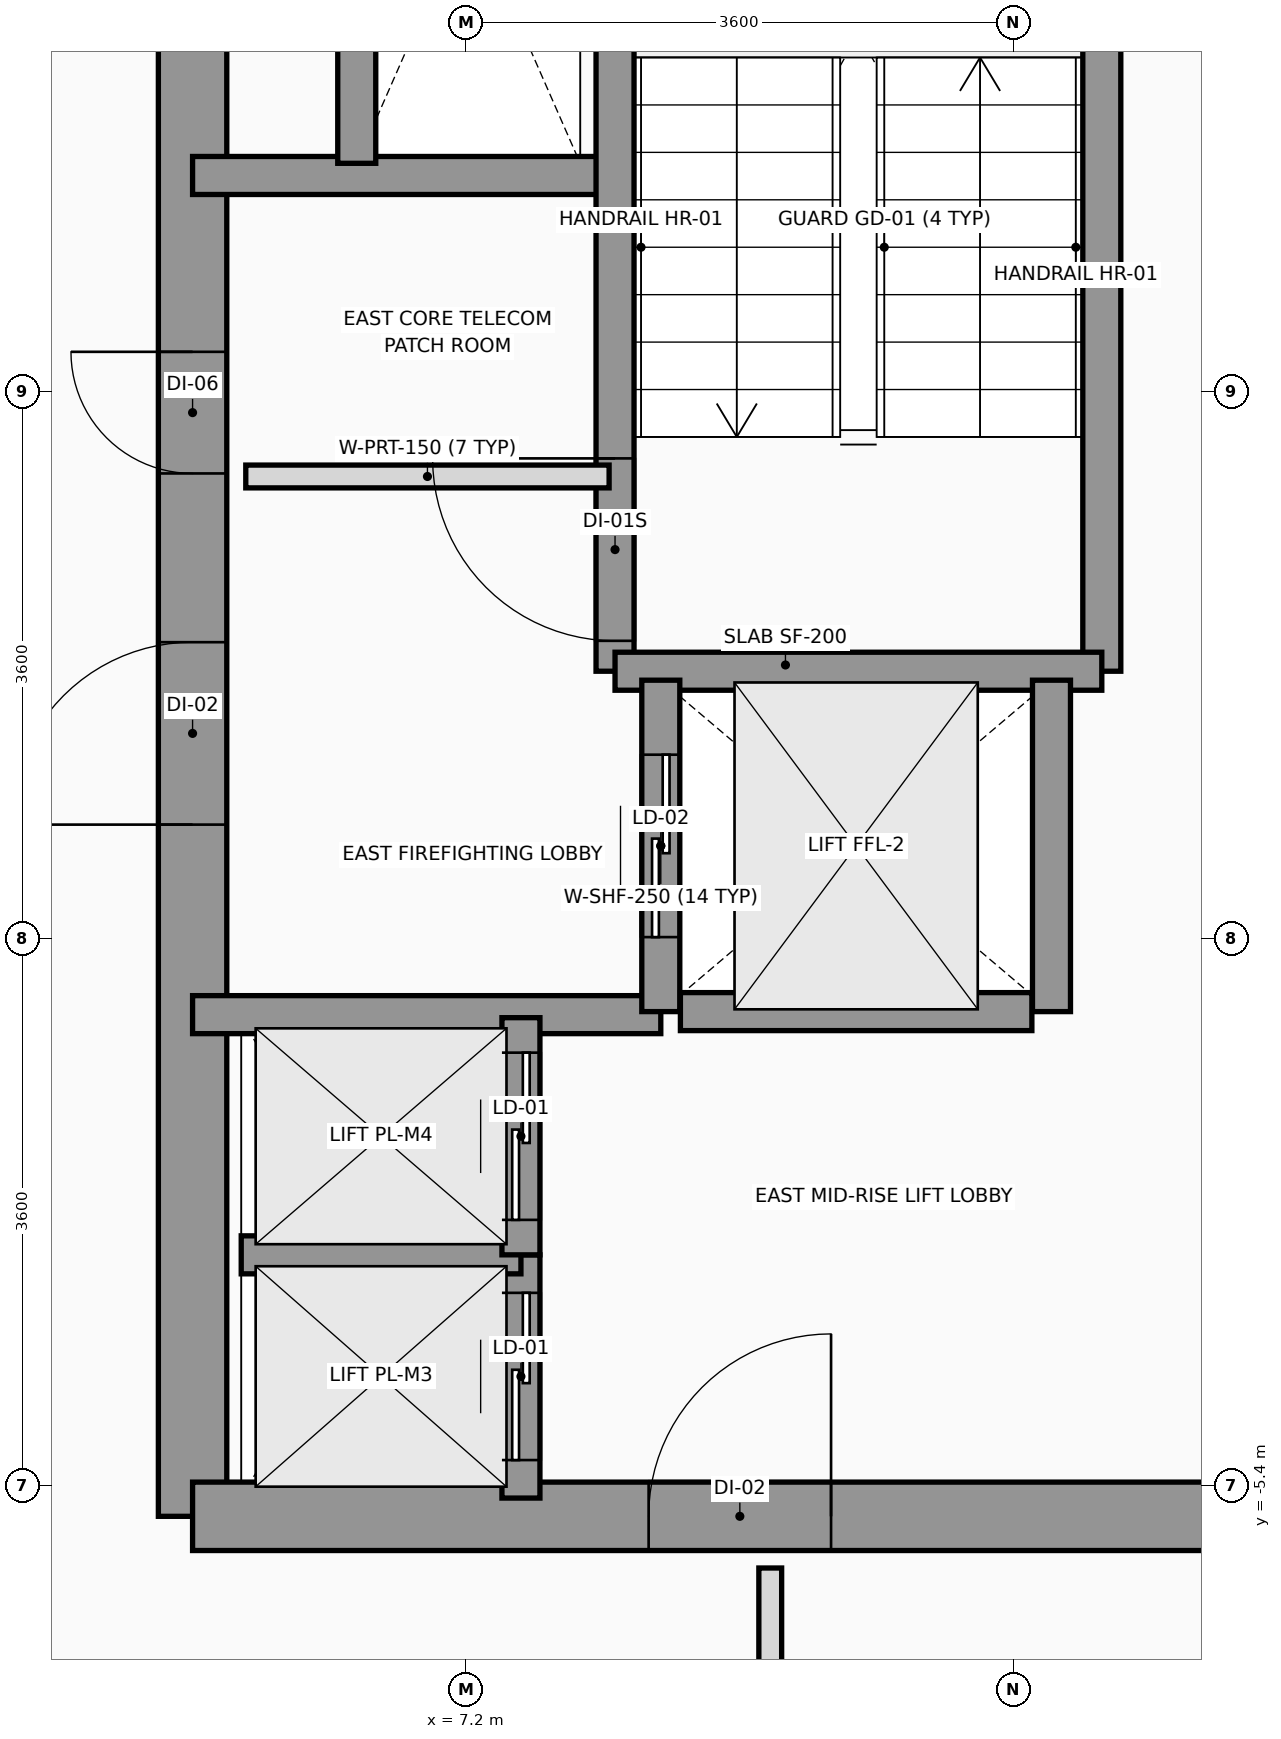
"""IFC4 building model, lengths in metres.
Left out: names, types, materials, properties, quantities, classifications, styles, units other than length and angle.
Written with IfcOpenShell. Run it as: python <this file> out.ifc"""

import sys

from ifc_helpers import new_model, si_unit, direction, frame, frame_2d, origin, place, context, subcontext, project, spatial, rectangle, extrude, source, transform, mapped, element, fill, save


model = new_model("IFC4")
c1 = context("Model", 3, precision=1e-05, world=origin(), true_north=direction((0.0, 1.0)))
c2 = subcontext(c1, "Body", "Model", "MODEL_VIEW")
j1 = project(units=[si_unit("LENGTHUNIT", "METRE"), si_unit("PLANEANGLEUNIT", "RADIAN")], contexts=[c1])
p1 = place(None, origin())
s1 = spatial("IfcSite", under=j1, at=p1, CompositionType="ELEMENT")
p2 = place(p1, origin())
s2 = spatial("IfcBuilding", under=s1, at=p2, CompositionType="ELEMENT")
p3 = place(p2, frame((0.0, 0.0, 100.6)))
s3 = spatial("IfcBuildingStorey", under=s2, at=p3, CompositionType="ELEMENT", Elevation=100.6)
p4 = place(p3, frame((5.4, -5.6, 0.0), z_axis=(0.0, 0.0, 1.0), x_axis=(0.0, 1.0, 0.0)))
e1 = element("IfcWall", 1, at=p4, inside=s3, PredefinedType="SHEAR", context=c2, shape_type="SweptSolid", body=[
    extrude(rectangle(XDim=12.5, YDim=0.45, at=frame_2d((6.25, 0.0))), origin(), (0.0, 0.0, 1.0), 3.2),
])
p5 = place(p4, frame((4.55, 0.0, 0.0)))
e2 = element("IfcOpeningElement", 2, at=p5, cuts=e1, PredefinedType="OPENING", context=c2, shape_type="SweptSolid", body=[
    extrude(rectangle(XDim=1.2, YDim=2.2, at=frame_2d((0.6, 1.1))), frame((0.0, 0.235, 0.0), z_axis=(0.0, -1.0, 0.0), x_axis=(1.0, 0.0, 0.0)), (0.0, 0.0, 1.0), 0.47),
])
p6 = place(p4, frame((6.86, 0.0, 0.0)))
e3 = element("IfcOpeningElement", 3, at=p6, cuts=e1, PredefinedType="OPENING", context=c2, shape_type="SweptSolid", body=[
    extrude(rectangle(XDim=0.8, YDim=2.1, at=frame_2d((0.4, 1.05))), frame((0.0, 0.235, 0.0), z_axis=(0.0, -1.0, 0.0), x_axis=(1.0, 0.0, 0.0)), (0.0, 0.0, 1.0), 0.47),
])
p7 = place(p3, frame((5.4, -5.6, 0.0), z_axis=(0.0, 0.0, 1.0), x_axis=(1.0, 0.0, 0.0)))
e4 = element("IfcWall", 4, at=p7, inside=s3, PredefinedType="SHEAR", context=c2, shape_type="SweptSolid", body=[
    extrude(rectangle(XDim=7.8, YDim=0.45, at=frame_2d((3.9, 0.0))), origin(), (0.0, 0.0, 1.0), 3.2),
])
p8 = place(p7, frame((3.0, 0.0, 0.0)))
e5 = element("IfcOpeningElement", 5, at=p8, cuts=e4, PredefinedType="OPENING", context=c2, shape_type="SweptSolid", body=[
    extrude(rectangle(XDim=1.2, YDim=2.2, at=frame_2d((0.6, 1.1))), frame((0.0, 0.235, 0.0), z_axis=(0.0, -1.0, 0.0), x_axis=(1.0, 0.0, 0.0)), (0.0, 0.0, 1.0), 0.47),
])
p9 = place(p3, frame((5.4, 3.22, 0.0), z_axis=(0.0, 0.0, 1.0), x_axis=(1.0, 0.0, 0.0)))
e6 = element("IfcWall", 6, at=p9, inside=s3, PredefinedType="SOLIDWALL", context=c2, shape_type="SweptSolid", body=[
    extrude(rectangle(XDim=2.78, YDim=0.25, at=frame_2d((1.39, 0.0))), origin(), (0.0, 0.0, 1.0), 3.2),
])
p10 = place(p3, frame((5.4, -2.3, 0.0), z_axis=(0.0, 0.0, 1.0), x_axis=(1.0, 0.0, 0.0)))
e7 = element("IfcWall", 7, at=p10, inside=s3, PredefinedType="SOLIDWALL", context=c2, shape_type="SweptSolid", body=[
    extrude(rectangle(XDim=3.08, YDim=0.25, at=frame_2d((1.54, 0.0))), origin(), (0.0, 0.0, 1.0), 3.2),
])
p11 = place(p3, frame((8.179, -0.041, 0.0), z_axis=(0.0, 0.0, 1.0), x_axis=(0.0, 1.0, 0.0)))
e8 = element("IfcWall", 8, at=p11, inside=s3, PredefinedType="SOLIDWALL", context=c2, shape_type="SweptSolid", body=[
    extrude(rectangle(XDim=6.941, YDim=0.25, at=frame_2d((3.47, 0.0))), origin(), (0.0, 0.0, 1.0), 3.2),
])
p12 = place(p11, frame((0.2, 0.0, 0.0)))
e9 = element("IfcOpeningElement", 9, at=p12, cuts=e8, PredefinedType="OPENING", context=c2, shape_type="SweptSolid", body=[
    extrude(rectangle(XDim=1.2, YDim=2.2, at=frame_2d((0.6, 1.1))), frame((0.0, 0.135, 0.0), z_axis=(0.0, -1.0, 0.0), x_axis=(1.0, 0.0, 0.0)), (0.0, 0.0, 1.0), 0.27),
])
p13 = place(p3, frame((11.381, -0.041, 0.0), z_axis=(0.0, 0.0, 1.0), x_axis=(0.0, 1.0, 0.0)))
e10 = element("IfcWall", 10, at=p13, inside=s3, PredefinedType="SOLIDWALL", context=c2, shape_type="SweptSolid", body=[
    extrude(rectangle(XDim=6.941, YDim=0.25, at=frame_2d((3.47, 0.0))), origin(), (0.0, 0.0, 1.0), 3.2),
])
p14 = place(p3, frame((8.179, -0.041, 0.0), z_axis=(0.0, 0.0, 1.0), x_axis=(1.0, 0.0, 0.0)))
e11 = element("IfcWall", 11, at=p14, inside=s3, PredefinedType="SOLIDWALL", context=c2, shape_type="SweptSolid", body=[
    extrude(rectangle(XDim=3.202, YDim=0.25, at=frame_2d((1.601, 0.0))), origin(), (0.0, 0.0, 1.0), 3.2),
])
p15 = place(p3, frame((8.48, -2.28, 0.0), z_axis=(0.0, 0.0, 1.0), x_axis=(0.0, 1.0, 0.0)))
e12 = element("IfcWall", 12, at=p15, inside=s3, PredefinedType="SOLIDWALL", context=c2, shape_type="SweptSolid", body=[
    extrude(rectangle(XDim=2.18, YDim=0.25, at=frame_2d((1.09, 0.0))), origin(), (0.0, 0.0, 1.0), 3.2),
])
p16 = place(p15, frame((0.49, 0.0, 0.0)))
e13 = element("IfcOpeningElement", 13, at=p16, cuts=e12, PredefinedType="OPENING", context=c2, shape_type="SweptSolid", body=[
    extrude(rectangle(XDim=1.2, YDim=2.2, at=frame_2d((0.6, 1.1))), frame((0.0, 0.135, 0.0), z_axis=(0.0, -1.0, 0.0), x_axis=(1.0, 0.0, 0.0)), (0.0, 0.0, 1.0), 0.27),
])
p17 = place(p3, frame((11.05, -2.28, 0.0), z_axis=(0.0, 0.0, 1.0), x_axis=(0.0, 1.0, 0.0)))
e14 = element("IfcWall", 14, at=p17, inside=s3, PredefinedType="SOLIDWALL", context=c2, shape_type="SweptSolid", body=[
    extrude(rectangle(XDim=2.18, YDim=0.25, at=frame_2d((1.09, 0.0))), origin(), (0.0, 0.0, 1.0), 3.2),
])
p18 = place(p3, frame((8.609, -2.28, 0.0), z_axis=(0.0, 0.0, 1.0), x_axis=(1.0, 0.0, 0.0)))
e15 = element("IfcWall", 15, at=p18, inside=s3, PredefinedType="SOLIDWALL", context=c2, shape_type="SweptSolid", body=[
    extrude(rectangle(XDim=2.312, YDim=0.25, at=frame_2d((1.156, 0.0))), origin(), (0.0, 0.0, 1.0), 3.2),
])
p19 = place(p3, frame((7.56, -5.48, 0.0), z_axis=(0.0, 0.0, 1.0), x_axis=(0.0, 1.0, 0.0)))
e16 = element("IfcWall", 16, at=p19, inside=s3, PredefinedType="SOLIDWALL", context=c2, shape_type="SweptSolid", body=[
    extrude(rectangle(XDim=1.6, YDim=0.25, at=frame_2d((0.8, 0.0))), origin(), (0.0, 0.0, 1.0), 3.2),
])
p20 = place(p19, frame((0.25, 0.0, 0.0)))
e17 = element("IfcOpeningElement", 17, at=p20, cuts=e16, PredefinedType="OPENING", context=c2, shape_type="SweptSolid", body=[
    extrude(rectangle(XDim=1.1, YDim=2.2, at=frame_2d((0.55, 1.1))), frame((0.0, 0.135, 0.0), z_axis=(0.0, -1.0, 0.0), x_axis=(1.0, 0.0, 0.0)), (0.0, 0.0, 1.0), 0.27),
])
p21 = place(p3, frame((5.72, -3.88, 0.0), z_axis=(0.0, 0.0, 1.0), x_axis=(1.0, 0.0, 0.0)))
e18 = element("IfcWall", 18, at=p21, inside=s3, PredefinedType="SOLIDWALL", context=c2, shape_type="SweptSolid", body=[
    extrude(rectangle(XDim=1.84, YDim=0.25, at=frame_2d((0.92, 0.0))), origin(), (0.0, 0.0, 1.0), 3.2),
])
p22 = place(p3, frame((7.56, -3.88, 0.0), z_axis=(0.0, 0.0, 1.0), x_axis=(0.0, 1.0, 0.0)))
e19 = element("IfcWall", 19, at=p22, inside=s3, PredefinedType="SOLIDWALL", context=c2, shape_type="SweptSolid", body=[
    extrude(rectangle(XDim=1.56, YDim=0.25, at=frame_2d((0.78, 0.0))), origin(), (0.0, 0.0, 1.0), 3.2),
])
p23 = place(p22, frame((0.23, 0.0, 0.0)))
e20 = element("IfcOpeningElement", 20, at=p23, cuts=e19, PredefinedType="OPENING", context=c2, shape_type="SweptSolid", body=[
    extrude(rectangle(XDim=1.1, YDim=2.2, at=frame_2d((0.55, 1.1))), frame((0.0, 0.135, 0.0), z_axis=(0.0, -1.0, 0.0), x_axis=(1.0, 0.0, 0.0)), (0.0, 0.0, 1.0), 0.27),
])
p24 = place(p3, frame((6.48, 3.3, 0.0), z_axis=(0.0, 0.0, 1.0), x_axis=(0.0, 1.0, 0.0)))
e21 = element("IfcWall", 21, at=p24, inside=s3, PredefinedType="SOLIDWALL", context=c2, shape_type="SweptSolid", body=[
    extrude(rectangle(XDim=1.68, YDim=0.25, at=frame_2d((0.84, 0.0))), origin(), (0.0, 0.0, 1.0), 3.2),
])
p25 = place(p3, frame((5.75, 1.24, 0.0), z_axis=(0.0, 0.0, 1.0), x_axis=(1.0, 0.0, 0.0)))
e22 = element("IfcWall", 22, at=p25, inside=s3, PredefinedType="PARTITIONING", context=c2, shape_type="SweptSolid", body=[
    extrude(rectangle(XDim=2.39, YDim=0.15, at=frame_2d((1.195, 0.0))), origin(), (0.0, 0.0, 1.0), 2.3),
])
p26 = place(p3, frame((9.2, -15.68, 0.0), z_axis=(0.0, 0.0, 1.0), x_axis=(0.0, 1.0, 0.0)))
e23 = element("IfcWall", 23, at=p26, inside=s3, PredefinedType="PARTITIONING", context=c2, shape_type="SweptSolid", body=[
    extrude(rectangle(XDim=9.74, YDim=0.15, at=frame_2d((4.87, 0.0))), origin(), (0.0, 0.0, 1.0), 2.7),
])
m1 = source(origin(), c2, "Body", "SweptSolid", [
    extrude(rectangle(XDim=1.2, YDim=2.2, at=frame_2d((0.6, 1.1))), frame((0.0, 0.025, 0.0), z_axis=(0.0, -1.0, 0.0), x_axis=(1.0, 0.0, 0.0)), (0.0, 0.0, 1.0), 0.05),
])
p27 = place(p12, origin())
e24 = element("IfcDoor", 24, at=p27, inside=s3, OperationType="SINGLE_SWING_RIGHT", PredefinedType="DOOR", context=c2, shape_type="MappedRepresentation", body=[
    mapped(m1, transform((0.0, 0.0, 0.0), x_axis=(1.0, 0.0, 0.0), y_axis=(0.0, 1.0, 0.0), z_axis=(0.0, 0.0, 1.0), scale=1.0)),
])
fill(e9, e24)
p28 = place(p5, origin())
e25 = element("IfcDoor", 25, at=p28, inside=s3, OperationType="SINGLE_SWING_LEFT", PredefinedType="DOOR", context=c2, shape_type="MappedRepresentation", body=[
    mapped(m1, transform((0.0, 0.0, 0.0), x_axis=(1.0, 0.0, 0.0), y_axis=(0.0, 1.0, 0.0), z_axis=(0.0, 0.0, 1.0), scale=1.0)),
])
fill(e2, e25)
p29 = place(p8, origin())
e26 = element("IfcDoor", 26, at=p29, inside=s3, OperationType="SINGLE_SWING_RIGHT", PredefinedType="DOOR", context=c2, shape_type="MappedRepresentation", body=[
    mapped(m1, transform((0.0, 0.0, 0.0), x_axis=(1.0, 0.0, 0.0), y_axis=(0.0, 1.0, 0.0), z_axis=(0.0, 0.0, 1.0), scale=1.0)),
])
fill(e5, e26)
m2 = source(origin(), c2, "Body", "SweptSolid", [
    extrude(rectangle(XDim=0.8, YDim=2.1, at=frame_2d((0.4, 1.05))), frame((0.0, 0.025, 0.0), z_axis=(0.0, -1.0, 0.0), x_axis=(1.0, 0.0, 0.0)), (0.0, 0.0, 1.0), 0.05),
])
p30 = place(p6, origin())
e27 = element("IfcDoor", 27, at=p30, inside=s3, OperationType="SINGLE_SWING_RIGHT", PredefinedType="DOOR", context=c2, shape_type="MappedRepresentation", body=[
    mapped(m2, transform((0.0, 0.0, 0.0), x_axis=(1.0, 0.0, 0.0), y_axis=(0.0, 1.0, 0.0), z_axis=(0.0, 0.0, 1.0), scale=1.0)),
])
fill(e3, e27)
p31 = place(p16, origin())
e28 = element("IfcDoor", 28, at=p31, inside=s3, OperationType="SLIDING_TO_RIGHT", PredefinedType="DOOR", context=c2, shape_type="MappedRepresentation", body=[
    mapped(m1, transform((0.0, 0.0, 0.0), x_axis=(1.0, 0.0, 0.0), y_axis=(0.0, 1.0, 0.0), z_axis=(0.0, 0.0, 1.0), scale=1.0)),
])
fill(e13, e28)
m3 = source(origin(), c2, "Body", "SweptSolid", [
    extrude(rectangle(XDim=1.1, YDim=2.2, at=frame_2d((0.55, 1.1))), frame((0.0, 0.025, 0.0), z_axis=(0.0, -1.0, 0.0), x_axis=(1.0, 0.0, 0.0)), (0.0, 0.0, 1.0), 0.05),
])
p32 = place(p20, origin())
e29 = element("IfcDoor", 29, at=p32, inside=s3, OperationType="SLIDING_TO_LEFT", PredefinedType="DOOR", context=c2, shape_type="MappedRepresentation", body=[
    mapped(m3, transform((0.0, 0.0, 0.0), x_axis=(1.0, 0.0, 0.0), y_axis=(0.0, 1.0, 0.0), z_axis=(0.0, 0.0, 1.0), scale=1.0)),
])
fill(e17, e29)
p33 = place(p23, origin())
e30 = element("IfcDoor", 30, at=p33, inside=s3, OperationType="SLIDING_TO_LEFT", PredefinedType="DOOR", context=c2, shape_type="MappedRepresentation", body=[
    mapped(m3, transform((0.0, 0.0, 0.0), x_axis=(1.0, 0.0, 0.0), y_axis=(0.0, 1.0, 0.0), z_axis=(0.0, 0.0, 1.0), scale=1.0)),
])
fill(e20, e30)
save(model, sys.argv[1])
